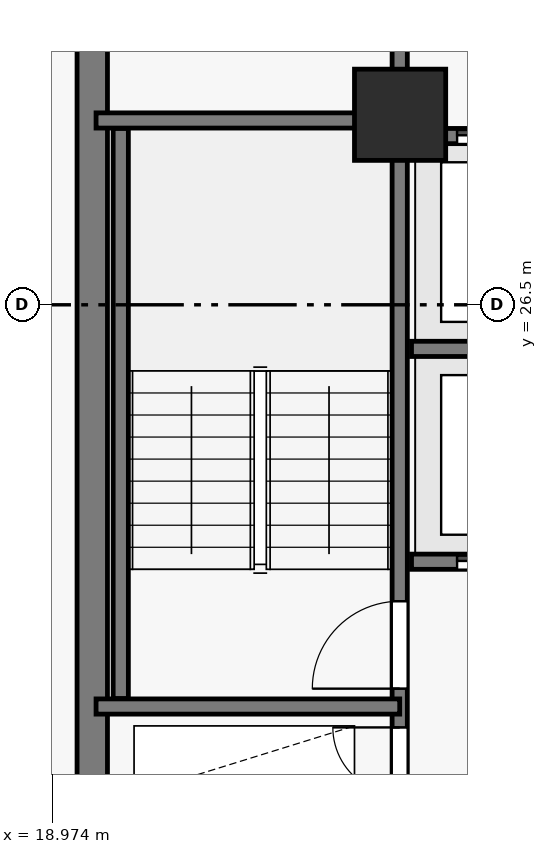
"""IFC4 building model, lengths in metres.
Left out: names, types, materials, properties, quantities, classifications, styles, units other than length and angle.
Written with IfcOpenShell. Run it as: python <this file> out.ifc"""

import sys

from ifc_helpers import new_model, si_unit, direction, frame, frame_2d, origin, origin_with_axes, origin_2d, place, context, subcontext, project, spatial, rectangle, extrude, source, transform, mapped, element, fill, save


model = new_model("IFC4")
c1 = context("Model", 3, precision=1e-05, world=origin(), true_north=direction((0.0, 1.0)))
c2 = subcontext(c1, "Body", "Model", "MODEL_VIEW")
j1 = project(units=[si_unit("LENGTHUNIT", "METRE"), si_unit("PLANEANGLEUNIT", "RADIAN")], contexts=[c1])
p1 = place(None, origin())
s1 = spatial("IfcSite", under=j1, at=p1, CompositionType="ELEMENT")
p2 = place(p1, origin())
s2 = spatial("IfcBuilding", under=s1, at=p2, CompositionType="ELEMENT")
p3 = place(p2, frame((0.0, 0.0, 99.25)))
s3 = spatial("IfcBuildingStorey", under=s2, at=p3, CompositionType="ELEMENT", Elevation=99.25)
p4 = place(p3, frame((19.5, 34.7, 0.0), z_axis=(0.0, 0.0, 1.0), x_axis=(0.0, -1.0, 0.0)))
e1 = element("IfcWall", 1, at=p4, inside=s3, PredefinedType="SHEAR", context=c2, shape_type="SweptSolid", body=[
    extrude(rectangle(XDim=16.4, YDim=0.4, at=frame_2d((8.2, 0.0))), origin(), (0.0, 0.0, 1.0), 2.825),
])
p5 = place(p4, frame((3.1, 0.0, 0.0)))
e2 = element("IfcOpeningElement", 2, at=p5, cuts=e1, PredefinedType="OPENING", context=c2, shape_type="SweptSolid", body=[
    extrude(rectangle(XDim=1.1, YDim=2.15, at=frame_2d((0.55, 1.075))), frame((0.0, 0.21, 0.0), z_axis=(0.0, -1.0, 0.0), x_axis=(1.0, 0.0, 0.0)), (0.0, 0.0, 1.0), 0.42),
])
m1 = source(origin_with_axes(), c2, "Body", "SweptSolid", [
    extrude(rectangle(XDim=1.2, YDim=1.2, at=origin_2d()), origin(), (0.0, 0.0, 1.0), 3.05),
])
p6 = place(p3, frame((23.55, 29.0, 0.0), z_axis=(0.0, 0.0, 1.0), x_axis=(1.0, 0.0, 0.0)))
e3 = element("IfcColumn", 3, at=p6, inside=s3, PredefinedType="COLUMN", context=c2, shape_type="MappedRepresentation", body=[
    mapped(m1, transform((0.0, 0.0, 0.0), scale=1.0)),
])
p7 = place(p3, frame((23.545, 18.7, 0.0), z_axis=(0.0, 0.0, 1.0), x_axis=(0.0, 1.0, 0.0)))
e4 = element("IfcWall", 4, at=p7, inside=s3, PredefinedType="SHEAR", context=c2, shape_type="SweptSolid", body=[
    extrude(rectangle(XDim=15.6, YDim=0.2, at=frame_2d((7.8, 0.0))), origin(), (0.0, 0.0, 1.0), 2.825),
])
p8 = place(p7, frame((2.75, 0.0, 0.0)))
e5 = element("IfcOpeningElement", 5, at=p8, cuts=e4, PredefinedType="OPENING", context=c2, shape_type="SweptSolid", body=[
    extrude(rectangle(XDim=1.15, YDim=2.15, at=frame_2d((0.575, 1.075))), frame((0.0, 0.11, 0.0), z_axis=(0.0, -1.0, 0.0), x_axis=(1.0, 0.0, 0.0)), (0.0, 0.0, 1.0), 0.22),
])
p9 = place(p7, frame((0.14, 0.0, 0.0)))
e6 = element("IfcOpeningElement", 6, at=p9, cuts=e4, PredefinedType="OPENING", context=c2, shape_type="SweptSolid", body=[
    extrude(rectangle(XDim=0.88, YDim=2.1, at=frame_2d((0.44, 1.05))), frame((0.0, 0.11, 0.0), z_axis=(0.0, -1.0, 0.0), x_axis=(1.0, 0.0, 0.0)), (0.0, 0.0, 1.0), 0.22),
])
p10 = place(p7, frame((1.36, 0.0, 0.0)))
e7 = element("IfcOpeningElement", 7, at=p10, cuts=e4, PredefinedType="OPENING", context=c2, shape_type="SweptSolid", body=[
    extrude(rectangle(XDim=0.88, YDim=2.1, at=frame_2d((0.44, 1.05))), frame((0.0, 0.11, 0.0), z_axis=(0.0, -1.0, 0.0), x_axis=(1.0, 0.0, 0.0)), (0.0, 0.0, 1.0), 0.22),
])
p11 = place(p7, frame((12.1, 0.0, 0.0)))
e8 = element("IfcOpeningElement", 8, at=p11, cuts=e4, PredefinedType="OPENING", context=c2, shape_type="SweptSolid", body=[
    extrude(rectangle(XDim=1.12, YDim=2.15, at=frame_2d((0.56, 1.075))), frame((0.0, 0.11, 0.0), z_axis=(0.0, -1.0, 0.0), x_axis=(1.0, 0.0, 0.0)), (0.0, 0.0, 1.0), 0.22),
])
p12 = place(p7, frame((14.05, 0.0, 0.0)))
e9 = element("IfcOpeningElement", 9, at=p12, cuts=e4, PredefinedType="OPENING", context=c2, shape_type="SweptSolid", body=[
    extrude(rectangle(XDim=1.12, YDim=2.15, at=frame_2d((0.56, 1.075))), frame((0.0, 0.11, 0.0), z_axis=(0.0, -1.0, 0.0), x_axis=(1.0, 0.0, 0.0)), (0.0, 0.0, 1.0), 0.22),
])
p13 = place(p3, frame((23.7, 23.12, 0.0), z_axis=(0.0, 0.0, 1.0), x_axis=(1.0, 0.0, 0.0)))
e10 = element("IfcWall", 10, at=p13, inside=s3, PredefinedType="SHEAR", context=c2, shape_type="SweptSolid", body=[
    extrude(rectangle(XDim=9.6, YDim=0.2, at=frame_2d((4.8, 0.0))), origin(), (0.0, 0.0, 1.0), 2.825),
])
p14 = place(p13, frame((0.6, 0.0, 0.0)))
e11 = element("IfcOpeningElement", 11, at=p14, cuts=e10, PredefinedType="OPENING", context=c2, shape_type="SweptSolid", body=[
    extrude(rectangle(XDim=1.1, YDim=2.15, at=frame_2d((0.55, 1.075))), frame((0.0, 0.11, 0.0), z_axis=(0.0, -1.0, 0.0), x_axis=(1.0, 0.0, 0.0)), (0.0, 0.0, 1.0), 0.22),
])
p15 = place(p13, frame((2.98, 0.0, 0.0)))
e12 = element("IfcOpeningElement", 12, at=p15, cuts=e10, PredefinedType="OPENING", context=c2, shape_type="SweptSolid", body=[
    extrude(rectangle(XDim=1.1, YDim=2.15, at=frame_2d((0.55, 1.075))), frame((0.0, 0.11, 0.0), z_axis=(0.0, -1.0, 0.0), x_axis=(1.0, 0.0, 0.0)), (0.0, 0.0, 1.0), 0.22),
])
p16 = place(p13, frame((5.36, 0.0, 0.0)))
e13 = element("IfcOpeningElement", 13, at=p16, cuts=e10, PredefinedType="OPENING", context=c2, shape_type="SweptSolid", body=[
    extrude(rectangle(XDim=1.1, YDim=2.15, at=frame_2d((0.55, 1.075))), frame((0.0, 0.11, 0.0), z_axis=(0.0, -1.0, 0.0), x_axis=(1.0, 0.0, 0.0)), (0.0, 0.0, 1.0), 0.22),
])
p17 = place(p13, frame((7.74, 0.0, 0.0)))
e14 = element("IfcOpeningElement", 14, at=p17, cuts=e10, PredefinedType="OPENING", context=c2, shape_type="SweptSolid", body=[
    extrude(rectangle(XDim=1.1, YDim=2.15, at=frame_2d((0.55, 1.075))), frame((0.0, 0.11, 0.0), z_axis=(0.0, -1.0, 0.0), x_axis=(1.0, 0.0, 0.0)), (0.0, 0.0, 1.0), 0.22),
])
p18 = place(p3, frame((23.7, 25.92, 0.0), z_axis=(0.0, 0.0, 1.0), x_axis=(1.0, 0.0, 0.0)))
e15 = element("IfcWall", 15, at=p18, inside=s3, PredefinedType="SHEAR", context=c2, shape_type="SweptSolid", body=[
    extrude(rectangle(XDim=9.6, YDim=0.2, at=frame_2d((4.8, 0.0))), origin(), (0.0, 0.0, 1.0), 2.825),
])
p19 = place(p3, frame((23.7, 28.72, 0.0), z_axis=(0.0, 0.0, 1.0), x_axis=(1.0, 0.0, 0.0)))
e16 = element("IfcWall", 16, at=p19, inside=s3, PredefinedType="SHEAR", context=c2, shape_type="SweptSolid", body=[
    extrude(rectangle(XDim=9.6, YDim=0.2, at=frame_2d((4.8, 0.0))), origin(), (0.0, 0.0, 1.0), 2.825),
])
p20 = place(p19, frame((0.6, 0.0, 0.0)))
e17 = element("IfcOpeningElement", 17, at=p20, cuts=e16, PredefinedType="OPENING", context=c2, shape_type="SweptSolid", body=[
    extrude(rectangle(XDim=1.1, YDim=2.15, at=frame_2d((0.55, 1.075))), frame((0.0, 0.11, 0.0), z_axis=(0.0, -1.0, 0.0), x_axis=(1.0, 0.0, 0.0)), (0.0, 0.0, 1.0), 0.22),
])
p21 = place(p19, frame((2.98, 0.0, 0.0)))
e18 = element("IfcOpeningElement", 18, at=p21, cuts=e16, PredefinedType="OPENING", context=c2, shape_type="SweptSolid", body=[
    extrude(rectangle(XDim=1.1, YDim=2.15, at=frame_2d((0.55, 1.075))), frame((0.0, 0.11, 0.0), z_axis=(0.0, -1.0, 0.0), x_axis=(1.0, 0.0, 0.0)), (0.0, 0.0, 1.0), 0.22),
])
p22 = place(p19, frame((5.36, 0.0, 0.0)))
e19 = element("IfcOpeningElement", 19, at=p22, cuts=e16, PredefinedType="OPENING", context=c2, shape_type="SweptSolid", body=[
    extrude(rectangle(XDim=1.1, YDim=2.15, at=frame_2d((0.55, 1.075))), frame((0.0, 0.11, 0.0), z_axis=(0.0, -1.0, 0.0), x_axis=(1.0, 0.0, 0.0)), (0.0, 0.0, 1.0), 0.22),
])
p23 = place(p19, frame((7.74, 0.0, 0.0)))
e20 = element("IfcOpeningElement", 20, at=p23, cuts=e16, PredefinedType="OPENING", context=c2, shape_type="SweptSolid", body=[
    extrude(rectangle(XDim=1.1, YDim=2.15, at=frame_2d((0.55, 1.075))), frame((0.0, 0.11, 0.0), z_axis=(0.0, -1.0, 0.0), x_axis=(1.0, 0.0, 0.0)), (0.0, 0.0, 1.0), 0.22),
])
p24 = place(p3, frame((19.875, 21.32, 0.0), z_axis=(0.0, 0.0, 1.0), x_axis=(0.0, 1.0, 0.0)))
e21 = element("IfcWall", 21, at=p24, inside=s3, PredefinedType="SHEAR", context=c2, shape_type="SweptSolid", body=[
    extrude(rectangle(XDim=7.5, YDim=0.2, at=frame_2d((3.75, 0.0))), origin(), (0.0, 0.0, 1.0), 2.825),
])
for number, where, z_axis, x_axis in (
    (22, (19.55, 21.215, 0.0), (0.0, 0.0, 1.0), (1.0, 0.0, 0.0)),
    (23, (19.55, 28.925, 0.0), (0.0, 0.0, 1.0), (1.0, 0.0, 0.0)),
):
    element("IfcWall", number, at=place(p3, frame(where, z_axis=z_axis, x_axis=x_axis)), inside=s3, PredefinedType="SHEAR", context=c2, shape_type="SweptSolid", body=[
        extrude(rectangle(XDim=3.995, YDim=0.2, at=frame_2d((1.998, 0.0))), origin(), (0.0, 0.0, 1.0), 2.825),
    ])
m2 = source(origin_with_axes(), c2, "Body", "SweptSolid", [
    extrude(rectangle(XDim=1.15, YDim=2.15, at=frame_2d((0.575, 1.075))), frame((0.0, 0.025, 0.0), z_axis=(0.0, -1.0, 0.0), x_axis=(1.0, 0.0, 0.0)), (0.0, 0.0, 1.0), 0.05),
])
p25 = place(p8, origin())
e24 = element("IfcDoor", 24, at=p25, inside=s3, OperationType="SINGLE_SWING_LEFT", PredefinedType="DOOR", context=c2, shape_type="MappedRepresentation", body=[
    mapped(m2, transform((0.0, 0.0, 0.0), scale=1.0)),
])
fill(e5, e24)
m3 = source(origin_with_axes(), c2, "Body", "SweptSolid", [
    extrude(rectangle(XDim=0.88, YDim=2.1, at=frame_2d((0.44, 1.05))), frame((0.0, 0.025, 0.0), z_axis=(0.0, -1.0, 0.0), x_axis=(1.0, 0.0, 0.0)), (0.0, 0.0, 1.0), 0.05),
])
p26 = place(p10, origin())
e25 = element("IfcDoor", 25, at=p26, inside=s3, OperationType="SINGLE_SWING_RIGHT", PredefinedType="DOOR", context=c2, shape_type="MappedRepresentation", body=[
    mapped(m3, transform((0.0, 0.0, 0.0), scale=1.0)),
])
fill(e7, e25)
m4 = source(origin_with_axes(), c2, "Body", "SweptSolid", [
    extrude(rectangle(XDim=1.1, YDim=2.15, at=frame_2d((0.55, 1.075))), frame((0.0, 0.025, 0.0), z_axis=(0.0, -1.0, 0.0), x_axis=(1.0, 0.0, 0.0)), (0.0, 0.0, 1.0), 0.05),
])
p27 = place(p14, origin())
e26 = element("IfcDoor", 26, at=p27, inside=s3, OperationType="SLIDING_TO_LEFT", PredefinedType="DOOR", context=c2, shape_type="MappedRepresentation", body=[
    mapped(m4, transform((0.0, 0.0, 0.0), scale=1.0)),
])
fill(e11, e26)
p28 = place(p20, origin())
e27 = element("IfcDoor", 27, at=p28, inside=s3, OperationType="SLIDING_TO_LEFT", PredefinedType="DOOR", context=c2, shape_type="MappedRepresentation", body=[
    mapped(m4, transform((0.0, 0.0, 0.0), scale=1.0)),
])
fill(e17, e27)
save(model, sys.argv[1])
